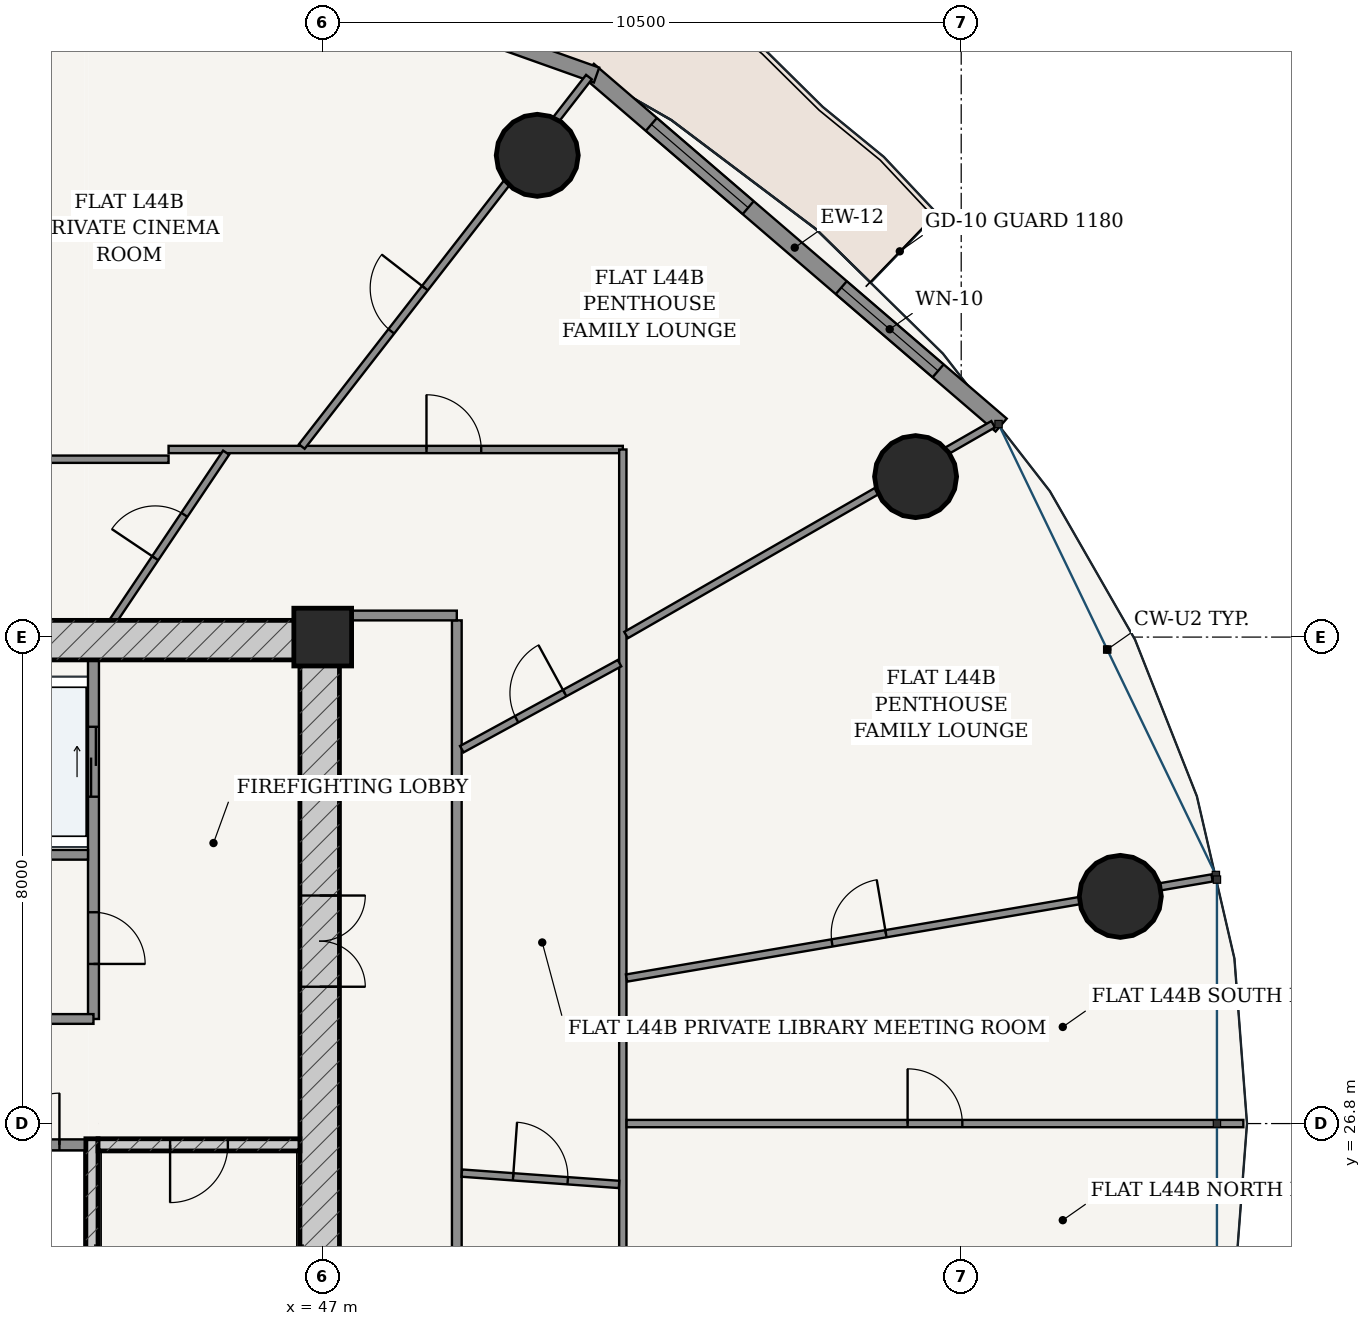
"""IFC4 building model, lengths in metres.
Left out: names, types, materials, properties, quantities, classifications, styles, units other than length and angle.
Written with IfcOpenShell. Run it as: python <this file> out.ifc"""

import sys

from ifc_helpers import new_model, si_unit, direction, frame, frame_2d, origin, origin_2d, place, context, subcontext, project, spatial, rectangle, hollow_circle, extrude, source, transform, mapped, element, fill, save


model = new_model("IFC4")
c1 = context("Model", 3, precision=1e-05, world=origin(), true_north=direction((-0.2419218956, 0.970295726276)))
c2 = subcontext(c1, "Body", "Model", "MODEL_VIEW")
j1 = project(units=[si_unit("LENGTHUNIT", "METRE"), si_unit("PLANEANGLEUNIT", "RADIAN")], contexts=[c1])
p1 = place(None, origin())
s1 = spatial("IfcSite", under=j1, at=p1, CompositionType="ELEMENT")
p2 = place(p1, origin())
s2 = spatial("IfcBuilding", under=s1, at=p2, CompositionType="ELEMENT")
p3 = place(p2, frame((0.0, 0.0, 167.8)))
s3 = spatial("IfcBuildingStorey", under=s2, at=p3, CompositionType="ELEMENT", Elevation=167.8)
p4 = place(p3, frame((47.0, 34.8, 0.0), z_axis=(0.0, 0.0, 1.0), x_axis=(1.0, 0.0, 0.0)))
e1 = element("IfcColumn", 1, at=p4, inside=s3, PredefinedType="COLUMN", context=c2, shape_type="SweptSolid", body=[
    extrude(rectangle(XDim=0.95, YDim=0.95, at=origin_2d()), origin(), (0.0, 0.0, 1.0), 3.6),
])
p5 = place(p3, frame((28.725, 34.75, 0.0), z_axis=(0.0, 0.0, 1.0), x_axis=(1.0, 0.0, 0.0)))
e2 = element("IfcWall", 2, at=p5, inside=s3, PredefinedType="SHEAR", context=c2, shape_type="SweptSolid", body=[
    extrude(rectangle(XDim=18.55, YDim=0.65, at=frame_2d((9.275, 0.0))), origin(), (0.0, 0.0, 1.0), 3.33),
])
p6 = place(p3, frame((46.95, 19.175, 0.0), z_axis=(0.0, 0.0, 1.0), x_axis=(0.0, 1.0, 0.0)))
e3 = element("IfcWall", 3, at=p6, inside=s3, PredefinedType="SHEAR", context=c2, shape_type="SweptSolid", body=[
    extrude(rectangle(XDim=15.25, YDim=0.65, at=frame_2d((7.625, 0.0))), origin(), (0.0, 0.0, 1.0), 3.33),
])
p7 = place(p6, frame((9.875, 0.0, 0.0)))
e4 = element("IfcOpeningElement", 4, at=p7, cuts=e3, PredefinedType="OPENING", context=c2, shape_type="SweptSolid", body=[
    extrude(rectangle(XDim=1.5, YDim=2.2, at=frame_2d((0.75, 1.1))), frame((0.0, 0.335, 0.0), z_axis=(0.0, -1.0, 0.0), x_axis=(1.0, 0.0, 0.0)), (0.0, 0.0, 1.0), 0.67),
])
p8 = place(p3, frame((43.205, 19.175, 0.0), z_axis=(0.0, 0.0, 1.0), x_axis=(0.0, 1.0, 0.0)))
e5 = element("IfcWall", 5, at=p8, inside=s3, PredefinedType="SOLIDWALL", context=c2, shape_type="SweptSolid", body=[
    extrude(rectangle(XDim=7.375, YDim=0.2, at=frame_2d((3.688, 0.0))), origin(), (0.0, 0.0, 1.0), 3.33),
])
p9 = place(p3, frame((43.305, 26.45, 0.0), z_axis=(0.0, 0.0, 1.0), x_axis=(1.0, 0.0, 0.0)))
e6 = element("IfcWall", 6, at=p9, inside=s3, PredefinedType="SOLIDWALL", context=c2, shape_type="SweptSolid", body=[
    extrude(rectangle(XDim=3.32, YDim=0.2, at=frame_2d((1.66, 0.0))), origin(), (0.0, 0.0, 1.0), 3.33),
])
p10 = place(p9, frame((1.185, 0.0, 0.0)))
e7 = element("IfcOpeningElement", 7, at=p10, cuts=e6, PredefinedType="OPENING", context=c2, shape_type="SweptSolid", body=[
    extrude(rectangle(XDim=0.95, YDim=2.15, at=frame_2d((0.475, 1.075))), frame((0.0, 0.11, 0.0), z_axis=(0.0, -1.0, 0.0), x_axis=(1.0, 0.0, 0.0)), (0.0, 0.0, 1.0), 0.22),
])
for number, where, z_axis, x_axis in (
    (8, (60.117, 30.536, 0.0), (0.0, 0.0, 1.0), (1.0, 0.0, 0.0)),
    (9, (56.75, 37.439, 0.0), (0.0, 0.0, 1.0), (1.0, 0.0, 0.0)),
    (10, (50.528, 42.723, 0.0), (0.0, 0.0, 1.0), (1.0, 0.0, 0.0)),
):
    element("IfcColumn", number, at=place(p3, frame(where, z_axis=z_axis, x_axis=x_axis)), inside=s3, PredefinedType="COLUMN", context=c2, shape_type="SweptSolid", body=[
        extrude(hollow_circle(Radius=0.675, WallThickness=0.042, at=origin_2d()), origin(), (0.0, 0.0, 1.0), 3.6),
    ])
p11 = place(p3, frame((58.157, 38.287, 0.0), z_axis=(0.0, 0.0, 1.0), x_axis=(-0.75843401647, 0.651749831348, 0.0)))
e11 = element("IfcWall", 11, at=p11, inside=s3, PredefinedType="SOLIDWALL", context=c2, shape_type="SweptSolid", body=[
    extrude(rectangle(XDim=8.952, YDim=0.28, at=frame_2d((4.476, 0.0))), origin(), (0.0, 0.0, 1.0), 3.33),
])
p12 = place(p11, frame((1.367, 0.0, 0.85)))
e12 = element("IfcOpeningElement", 12, at=p12, cuts=e11, PredefinedType="OPENING", context=c2, shape_type="SweptSolid", body=[
    extrude(rectangle(XDim=2.1, YDim=1.95, at=frame_2d((1.05, 0.975))), frame((0.0, 0.15, 0.0), z_axis=(0.0, -1.0, 0.0), x_axis=(1.0, 0.0, 0.0)), (0.0, 0.0, 1.0), 0.3),
])
p13 = place(p11, frame((5.485, 0.0, 0.85)))
e13 = element("IfcOpeningElement", 13, at=p13, cuts=e11, PredefinedType="OPENING", context=c2, shape_type="SweptSolid", body=[
    extrude(rectangle(XDim=2.1, YDim=1.95, at=frame_2d((1.05, 0.975))), frame((0.0, 0.15, 0.0), z_axis=(0.0, -1.0, 0.0), x_axis=(1.0, 0.0, 0.0)), (0.0, 0.0, 1.0), 0.3),
])
p14 = place(p3, frame((51.503, 44.043, 0.0), z_axis=(0.0, 0.0, 1.0), x_axis=(-0.942095406405, 0.335344964522, 0.0)))
e14 = element("IfcWall", 14, at=p14, inside=s3, PredefinedType="SOLIDWALL", context=c2, shape_type="SweptSolid", body=[
    extrude(rectangle(XDim=9.408, YDim=0.26, at=frame_2d((4.704, 0.0))), origin(), (0.0, 0.0, 1.0), 3.33),
])
p15 = place(p14, frame((4.029, 0.0, 0.0)))
e15 = element("IfcOpeningElement", 15, at=p15, cuts=e14, PredefinedType="OPENING", context=c2, shape_type="SweptSolid", body=[
    extrude(rectangle(XDim=1.35, YDim=2.2, at=frame_2d((0.675, 1.1))), frame((0.0, 0.14, 0.0), z_axis=(0.0, -1.0, 0.0), x_axis=(1.0, 0.0, 0.0)), (0.0, 0.0, 1.0), 0.28),
])
p16 = place(p3, frame((41.39, 26.45, 0.0), z_axis=(0.0, 0.0, 1.0), x_axis=(1.0, 0.0, 0.0)))
e16 = element("IfcWall", 16, at=p16, inside=s3, PredefinedType="PARTITIONING", context=c2, shape_type="SweptSolid", body=[
    extrude(rectangle(XDim=1.71, YDim=0.18, at=frame_2d((0.855, 0.0))), origin(), (0.0, 0.0, 1.0), 3.33),
])
p17 = place(p16, frame((0.43, 0.0, 0.0)))
e17 = element("IfcOpeningElement", 17, at=p17, cuts=e16, PredefinedType="OPENING", context=c2, shape_type="SweptSolid", body=[
    extrude(rectangle(XDim=0.85, YDim=2.1, at=frame_2d((0.425, 1.05))), frame((0.0, 0.1, 0.0), z_axis=(0.0, -1.0, 0.0), x_axis=(1.0, 0.0, 0.0)), (0.0, 0.0, 1.0), 0.2),
])
p18 = place(p3, frame((43.23, 28.52, 0.0), z_axis=(0.0, 0.0, 1.0), x_axis=(0.0, 1.0, 0.0)))
e18 = element("IfcWall", 18, at=p18, inside=s3, PredefinedType="PARTITIONING", context=c2, shape_type="SweptSolid", body=[
    extrude(rectangle(XDim=5.905, YDim=0.18, at=frame_2d((2.953, 0.0))), origin(), (0.0, 0.0, 1.0), 3.33),
])
p19 = place(p18, frame((0.905, 0.0, 0.0)))
e19 = element("IfcOpeningElement", 19, at=p19, cuts=e18, PredefinedType="OPENING", context=c2, shape_type="SweptSolid", body=[
    extrude(rectangle(XDim=0.85, YDim=2.1, at=frame_2d((0.425, 1.05))), frame((0.0, 0.1, 0.0), z_axis=(0.0, -1.0, 0.0), x_axis=(1.0, 0.0, 0.0)), (0.0, 0.0, 1.0), 0.2),
])
p20 = place(p18, frame((3.655, 0.0, 0.0)))
e20 = element("IfcOpeningElement", 20, at=p20, cuts=e18, PredefinedType="OPENING", context=c2, shape_type="SweptSolid", body=[
    extrude(rectangle(XDim=1.15, YDim=2.2, at=frame_2d((0.575, 1.1))), frame((0.0, 0.1, 0.0), z_axis=(0.0, -1.0, 0.0), x_axis=(1.0, 0.0, 0.0)), (0.0, 0.0, 1.0), 0.2),
])
p21 = place(p3, frame((41.39, 31.22, 0.0), z_axis=(0.0, 0.0, 1.0), x_axis=(1.0, 0.0, 0.0)))
e21 = element("IfcWall", 21, at=p21, inside=s3, PredefinedType="PARTITIONING", context=c2, shape_type="SweptSolid", body=[
    extrude(rectangle(XDim=1.75, YDim=0.16, at=frame_2d((0.875, 0.0))), origin(), (0.0, 0.0, 1.0), 3.33),
])
p22 = place(p3, frame((41.39, 28.52, 0.0), z_axis=(0.0, 0.0, 1.0), x_axis=(1.0, 0.0, 0.0)))
e22 = element("IfcWall", 22, at=p22, inside=s3, PredefinedType="PARTITIONING", context=c2, shape_type="SweptSolid", body=[
    extrude(rectangle(XDim=1.84, YDim=0.16, at=frame_2d((0.92, 0.0))), origin(), (0.0, 0.0, 1.0), 3.33),
])
p23 = place(p3, frame((49.205, 16.675, 0.0), z_axis=(0.0, 0.0, 1.0), x_axis=(0.0, 1.0, 0.0)))
e23 = element("IfcWall", 23, at=p23, inside=s3, PredefinedType="PARTITIONING", context=c2, shape_type="SweptSolid", body=[
    extrude(rectangle(XDim=18.4, YDim=0.16, at=frame_2d((9.2, 0.0))), origin(), (0.0, 0.0, 1.0), 2.776),
])
p24 = place(p3, frame((47.275, 35.155, 0.0), z_axis=(0.0, 0.0, 1.0), x_axis=(1.0, 0.0, 0.0)))
e24 = element("IfcWall", 24, at=p24, inside=s3, PredefinedType="PARTITIONING", context=c2, shape_type="SweptSolid", body=[
    extrude(rectangle(XDim=1.93, YDim=0.16, at=frame_2d((0.965, 0.0))), origin(), (0.0, 0.0, 1.0), 2.776),
])
p25 = place(p3, frame((38.102, 37.725, 0.0), z_axis=(0.0, 0.0, 1.0), x_axis=(1.0, 0.0, 0.0)))
e25 = element("IfcWall", 25, at=p25, inside=s3, PredefinedType="PARTITIONING", context=c2, shape_type="SweptSolid", body=[
    extrude(rectangle(XDim=6.363, YDim=0.12, at=frame_2d((3.182, 0.0))), origin(), (0.0, 0.0, 1.0), 2.776),
])
p26 = place(p3, frame((44.465, 37.885, 0.0), z_axis=(0.0, 0.0, 1.0), x_axis=(1.0, 0.0, 0.0)))
e26 = element("IfcWall", 26, at=p26, inside=s3, PredefinedType="PARTITIONING", context=c2, shape_type="SweptSolid", body=[
    extrude(rectangle(XDim=7.47, YDim=0.12, at=frame_2d((3.735, 0.0))), origin(), (0.0, 0.0, 1.0), 2.776),
])
p27 = place(p26, frame((4.241, 0.0, 0.0)))
e27 = element("IfcOpeningElement", 27, at=p27, cuts=e26, PredefinedType="OPENING", context=c2, shape_type="SweptSolid", body=[
    extrude(rectangle(XDim=0.9, YDim=2.15, at=frame_2d((0.45, 1.075))), frame((0.0, 0.07, 0.0), z_axis=(0.0, -1.0, 0.0), x_axis=(1.0, 0.0, 0.0)), (0.0, 0.0, 1.0), 0.14),
])
p28 = place(p3, frame((51.935, 37.885, 0.0), z_axis=(0.0, 0.0, 1.0), x_axis=(0.0, -1.0, 0.0)))
e28 = element("IfcWall", 28, at=p28, inside=s3, PredefinedType="PARTITIONING", context=c2, shape_type="SweptSolid", body=[
    extrude(rectangle(XDim=24.02, YDim=0.12, at=frame_2d((12.01, 0.0))), origin(), (0.0, 0.0, 1.0), 2.776),
])
p29 = place(p28, frame((19.821, 0.0, 0.0)))
e29 = element("IfcOpeningElement", 29, at=p29, cuts=e28, PredefinedType="OPENING", context=c2, shape_type="SweptSolid", body=[
    extrude(rectangle(XDim=0.9, YDim=2.15, at=frame_2d((0.45, 1.075))), frame((0.0, 0.07, 0.0), z_axis=(0.0, -1.0, 0.0), x_axis=(1.0, 0.0, 0.0)), (0.0, 0.0, 1.0), 0.14),
])
p30 = place(p3, frame((51.997, 26.8, 0.0), z_axis=(0.0, 0.0, 1.0), x_axis=(1.0, 0.0, 0.0)))
e30 = element("IfcWall", 30, at=p30, inside=s3, PredefinedType="PARTITIONING", context=c2, shape_type="SweptSolid", body=[
    extrude(rectangle(XDim=10.143, YDim=0.12, at=frame_2d((5.071, 0.0))), origin(), (0.0, 0.0, 1.0), 2.846),
])
p31 = place(p30, frame((4.622, 0.0, 0.0)))
e31 = element("IfcOpeningElement", 31, at=p31, cuts=e30, PredefinedType="OPENING", context=c2, shape_type="SweptSolid", body=[
    extrude(rectangle(XDim=0.9, YDim=2.15, at=frame_2d((0.45, 1.075))), frame((0.0, 0.07, 0.0), z_axis=(0.0, -1.0, 0.0), x_axis=(1.0, 0.0, 0.0)), (0.0, 0.0, 1.0), 0.14),
])
p32 = place(p3, frame((51.996, 29.193, 0.0), z_axis=(0.0, 0.0, 1.0), x_axis=(0.985698378271, 0.168519159369, 0.0)))
e32 = element("IfcWall", 32, at=p32, inside=s3, PredefinedType="PARTITIONING", context=c2, shape_type="SweptSolid", body=[
    extrude(rectangle(XDim=9.769, YDim=0.12, at=frame_2d((4.884, 0.0))), origin(), (0.0, 0.0, 1.0), 2.776),
])
p33 = place(p32, frame((3.428, 0.0, 0.0)))
e33 = element("IfcOpeningElement", 33, at=p33, cuts=e32, PredefinedType="OPENING", context=c2, shape_type="SweptSolid", body=[
    extrude(rectangle(XDim=0.9, YDim=2.15, at=frame_2d((0.45, 1.075))), frame((0.0, 0.07, 0.0), z_axis=(0.0, -1.0, 0.0), x_axis=(1.0, 0.0, 0.0)), (0.0, 0.0, 1.0), 0.14),
])
p34 = place(p3, frame((51.989, 34.834, 0.0), z_axis=(0.0, 0.0, 1.0), x_axis=(0.86717064002, 0.498011125466, 0.0)))
e34 = element("IfcWall", 34, at=p34, inside=s3, PredefinedType="PARTITIONING", context=c2, shape_type="SweptSolid", body=[
    extrude(rectangle(XDim=6.961, YDim=0.12, at=frame_2d((3.48, 0.0))), origin(), (0.0, 0.0, 1.0), 2.776),
])
p35 = place(p3, frame((46.656, 37.934, 0.0), z_axis=(0.0, 0.0, 1.0), x_axis=(0.613758289074, 0.789493991487, 0.0)))
e35 = element("IfcWall", 35, at=p35, inside=s3, PredefinedType="PARTITIONING", context=c2, shape_type="SweptSolid", body=[
    extrude(rectangle(XDim=7.695, YDim=0.12, at=frame_2d((3.848, 0.0))), origin(), (0.0, 0.0, 1.0), 2.776),
])
p36 = place(p35, frame((2.399, 0.0, 0.0)))
e36 = element("IfcOpeningElement", 36, at=p36, cuts=e35, PredefinedType="OPENING", context=c2, shape_type="SweptSolid", body=[
    extrude(rectangle(XDim=0.9, YDim=2.15, at=frame_2d((0.45, 1.075))), frame((0.0, 0.07, 0.0), z_axis=(0.0, -1.0, 0.0), x_axis=(1.0, 0.0, 0.0)), (0.0, 0.0, 1.0), 0.14),
])
p37 = place(p3, frame((49.287, 25.985, 0.0), z_axis=(0.0, 0.0, 1.0), x_axis=(0.997408744903, -0.07194300237, 0.0)))
e37 = element("IfcWall", 37, at=p37, inside=s3, PredefinedType="PARTITIONING", context=c2, shape_type="SweptSolid", body=[
    extrude(rectangle(XDim=2.593, YDim=0.12, at=frame_2d((1.296, 0.0))), origin(), (0.0, 0.0, 1.0), 3.33),
])
p38 = place(p37, frame((0.846, 0.0, 0.0)))
e38 = element("IfcOpeningElement", 38, at=p38, cuts=e37, PredefinedType="OPENING", context=c2, shape_type="SweptSolid", body=[
    extrude(rectangle(XDim=0.9, YDim=2.15, at=frame_2d((0.45, 1.075))), frame((0.0, 0.07, 0.0), z_axis=(0.0, -1.0, 0.0), x_axis=(1.0, 0.0, 0.0)), (0.0, 0.0, 1.0), 0.14),
])
p39 = place(p3, frame((49.287, 32.957, 0.0), z_axis=(0.0, 0.0, 1.0), x_axis=(0.877892414948, 0.47885792024, 0.0)))
e39 = element("IfcWall", 39, at=p39, inside=s3, PredefinedType="PARTITIONING", context=c2, shape_type="SweptSolid", body=[
    extrude(rectangle(XDim=2.955, YDim=0.12, at=frame_2d((1.477, 0.0))), origin(), (0.0, 0.0, 1.0), 3.33),
])
p40 = place(p39, frame((1.027, 0.0, 0.0)))
e40 = element("IfcOpeningElement", 40, at=p40, cuts=e39, PredefinedType="OPENING", context=c2, shape_type="SweptSolid", body=[
    extrude(rectangle(XDim=0.9, YDim=2.15, at=frame_2d((0.45, 1.075))), frame((0.0, 0.07, 0.0), z_axis=(0.0, -1.0, 0.0), x_axis=(1.0, 0.0, 0.0)), (0.0, 0.0, 1.0), 0.14),
])
p41 = place(p3, frame((43.559, 35.075, 0.0), z_axis=(0.0, 0.0, 1.0), x_axis=(0.557612855606, 0.830101140381, 0.0)))
e41 = element("IfcWall", 41, at=p41, inside=s3, PredefinedType="PARTITIONING", context=c2, shape_type="SweptSolid", body=[
    extrude(rectangle(XDim=3.323, YDim=0.12, at=frame_2d((1.662, 0.0))), origin(), (0.0, 0.0, 1.0), 3.33),
])
p42 = place(p41, frame((1.232, 0.0, 0.0)))
e42 = element("IfcOpeningElement", 42, at=p42, cuts=e41, PredefinedType="OPENING", context=c2, shape_type="SweptSolid", body=[
    extrude(rectangle(XDim=0.86, YDim=2.15, at=frame_2d((0.43, 1.075))), frame((0.0, 0.07, 0.0), z_axis=(0.0, -1.0, 0.0), x_axis=(1.0, 0.0, 0.0)), (0.0, 0.0, 1.0), 0.14),
])
m1 = source(origin(), c2, "Body", "SweptSolid", [
    extrude(rectangle(XDim=2.1, YDim=1.95, at=frame_2d((1.05, 0.975))), frame((0.0, 0.03, 0.0), z_axis=(0.0, -1.0, 0.0), x_axis=(1.0, 0.0, 0.0)), (0.0, 0.0, 1.0), 0.06),
])
p43 = place(p12, origin())
e43 = element("IfcWindow", 43, at=p43, inside=s3, PartitioningType="SINGLE_PANEL", PredefinedType="WINDOW", context=c2, shape_type="MappedRepresentation", body=[
    mapped(m1, transform((0.0, 0.0, 0.0), scale=1.0)),
])
fill(e12, e43)
p44 = place(p13, origin())
e44 = element("IfcWindow", 44, at=p44, inside=s3, PartitioningType="SINGLE_PANEL", PredefinedType="WINDOW", context=c2, shape_type="MappedRepresentation", body=[
    mapped(m1, transform((0.0, 0.0, 0.0), scale=1.0)),
])
fill(e13, e44)
m2 = source(origin(), c2, "Body", "SweptSolid", [
    extrude(rectangle(XDim=1.5, YDim=2.2, at=frame_2d((0.75, 1.1))), frame((0.0, 0.025, 0.0), z_axis=(0.0, -1.0, 0.0), x_axis=(1.0, 0.0, 0.0)), (0.0, 0.0, 1.0), 0.05),
])
p45 = place(p7, frame((1.5, 0.0, 0.0), z_axis=(0.0, 0.0, 1.0), x_axis=(-1.0, 0.0, 0.0)))
e45 = element("IfcDoor", 45, at=p45, inside=s3, OperationType="DOUBLE_DOOR_SINGLE_SWING", PredefinedType="DOOR", context=c2, shape_type="MappedRepresentation", body=[
    mapped(m2, transform((0.0, 0.0, 0.0), scale=1.0)),
])
fill(e4, e45)
m3 = source(origin(), c2, "Body", "SweptSolid", [
    extrude(rectangle(XDim=0.95, YDim=2.15, at=frame_2d((0.475, 1.075))), frame((0.0, 0.025, 0.0), z_axis=(0.0, -1.0, 0.0), x_axis=(1.0, 0.0, 0.0)), (0.0, 0.0, 1.0), 0.05),
])
p46 = place(p10, frame((0.95, 0.0, 0.0), z_axis=(0.0, 0.0, 1.0), x_axis=(-1.0, 0.0, 0.0)))
e46 = element("IfcDoor", 46, at=p46, inside=s3, OperationType="SINGLE_SWING_RIGHT", PredefinedType="DOOR", context=c2, shape_type="MappedRepresentation", body=[
    mapped(m3, transform((0.0, 0.0, 0.0), scale=1.0)),
])
fill(e7, e46)
m4 = source(origin(), c2, "Body", "SweptSolid", [
    extrude(rectangle(XDim=0.85, YDim=2.1, at=frame_2d((0.425, 1.05))), frame((0.0, 0.025, 0.0), z_axis=(0.0, -1.0, 0.0), x_axis=(1.0, 0.0, 0.0)), (0.0, 0.0, 1.0), 0.05),
])
p47 = place(p17, origin())
e47 = element("IfcDoor", 47, at=p47, inside=s3, OperationType="SINGLE_SWING_RIGHT", PredefinedType="DOOR", context=c2, shape_type="MappedRepresentation", body=[
    mapped(m4, transform((0.0, 0.0, 0.0), scale=1.0)),
])
fill(e17, e47)
p48 = place(p19, frame((0.85, 0.0, 0.0), z_axis=(0.0, 0.0, 1.0), x_axis=(-1.0, 0.0, 0.0)))
e48 = element("IfcDoor", 48, at=p48, inside=s3, OperationType="SINGLE_SWING_RIGHT", PredefinedType="DOOR", context=c2, shape_type="MappedRepresentation", body=[
    mapped(m4, transform((0.0, 0.0, 0.0), scale=1.0)),
])
fill(e19, e48)
m5 = source(origin(), c2, "Body", "SweptSolid", [
    extrude(rectangle(XDim=1.15, YDim=2.2, at=frame_2d((0.575, 1.1))), frame((0.0, 0.025, 0.0), z_axis=(0.0, -1.0, 0.0), x_axis=(1.0, 0.0, 0.0)), (0.0, 0.0, 1.0), 0.05),
])
p49 = place(p20, origin())
e49 = element("IfcDoor", 49, at=p49, inside=s3, OperationType="DOUBLE_DOOR_SLIDING", PredefinedType="DOOR", context=c2, shape_type="MappedRepresentation", body=[
    mapped(m5, transform((0.0, 0.0, 0.0), scale=1.0)),
])
fill(e20, e49)
m6 = source(origin(), c2, "Body", "SweptSolid", [
    extrude(rectangle(XDim=0.9, YDim=2.15, at=frame_2d((0.45, 1.075))), frame((0.0, 0.025, 0.0), z_axis=(0.0, -1.0, 0.0), x_axis=(1.0, 0.0, 0.0)), (0.0, 0.0, 1.0), 0.05),
])
p50 = place(p38, origin())
e50 = element("IfcDoor", 50, at=p50, inside=s3, OperationType="SINGLE_SWING_LEFT", PredefinedType="DOOR", context=c2, shape_type="MappedRepresentation", body=[
    mapped(m6, transform((0.0, 0.0, 0.0), scale=1.0)),
])
fill(e38, e50)
p51 = place(p40, origin())
e51 = element("IfcDoor", 51, at=p51, inside=s3, OperationType="SINGLE_SWING_RIGHT", PredefinedType="DOOR", context=c2, shape_type="MappedRepresentation", body=[
    mapped(m6, transform((0.0, 0.0, 0.0), scale=1.0)),
])
fill(e40, e51)
m7 = source(origin(), c2, "Body", "SweptSolid", [
    extrude(rectangle(XDim=0.86, YDim=2.15, at=frame_2d((0.43, 1.075))), frame((0.0, 0.025, 0.0), z_axis=(0.0, -1.0, 0.0), x_axis=(1.0, 0.0, 0.0)), (0.0, 0.0, 1.0), 0.05),
])
p52 = place(p42, origin())
e52 = element("IfcDoor", 52, at=p52, inside=s3, OperationType="SINGLE_SWING_LEFT", PredefinedType="DOOR", context=c2, shape_type="MappedRepresentation", body=[
    mapped(m7, transform((0.0, 0.0, 0.0), scale=1.0)),
])
fill(e42, e52)
p53 = place(p31, origin())
e53 = element("IfcDoor", 53, at=p53, inside=s3, OperationType="SINGLE_SWING_LEFT", PredefinedType="DOOR", context=c2, shape_type="MappedRepresentation", body=[
    mapped(m6, transform((0.0, 0.0, 0.0), scale=1.0)),
])
fill(e31, e53)
p54 = place(p33, origin())
e54 = element("IfcDoor", 54, at=p54, inside=s3, OperationType="SINGLE_SWING_RIGHT", PredefinedType="DOOR", context=c2, shape_type="MappedRepresentation", body=[
    mapped(m6, transform((0.0, 0.0, 0.0), scale=1.0)),
])
fill(e33, e54)
p55 = place(p27, origin())
e55 = element("IfcDoor", 55, at=p55, inside=s3, OperationType="SINGLE_SWING_LEFT", PredefinedType="DOOR", context=c2, shape_type="MappedRepresentation", body=[
    mapped(m6, transform((0.0, 0.0, 0.0), scale=1.0)),
])
fill(e27, e55)
p56 = place(p36, origin())
e56 = element("IfcDoor", 56, at=p56, inside=s3, OperationType="SINGLE_SWING_RIGHT", PredefinedType="DOOR", context=c2, shape_type="MappedRepresentation", body=[
    mapped(m6, transform((0.0, 0.0, 0.0), scale=1.0)),
])
fill(e36, e56)
save(model, sys.argv[1])
